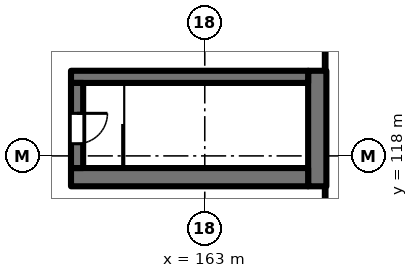
"""IFC4 building model, lengths in metres.
Left out: names, types, materials, properties, quantities, classifications, styles, units other than length and angle.
Written with IfcOpenShell. Run it as: python <this file> out.ifc"""

import sys

from ifc_helpers import new_model, si_unit, direction, frame, frame_2d, origin, place, context, subcontext, project, spatial, rectangle, extrude, element, fill, save


model = new_model("IFC4")
c1 = context("Model", 3, precision=1e-05, world=origin(), true_north=direction((0.0, 1.0)))
c2 = subcontext(c1, "Body", "Model", "MODEL_VIEW")
j1 = project(units=[si_unit("LENGTHUNIT", "METRE"), si_unit("PLANEANGLEUNIT", "RADIAN")], contexts=[c1])
p1 = place(None, origin())
s1 = spatial("IfcSite", under=j1, at=p1, CompositionType="ELEMENT")
p2 = place(p1, origin())
s2 = spatial("IfcBuilding", under=s1, at=p2, CompositionType="ELEMENT")
p3 = place(p2, frame((0.0, 0.0, 89.0)))
s3 = spatial("IfcBuildingStorey", under=s2, at=p3, CompositionType="ELEMENT", Elevation=89.0)
p4 = place(p3, frame((166.7, 120.8, 0.0), z_axis=(0.0, 0.0, 1.0), x_axis=(0.0, -1.0, 0.0)))
e1 = element("IfcWall", 1, at=p4, inside=s3, PredefinedType="SHEAR", context=c2, shape_type="SweptSolid", body=[
    extrude(rectangle(XDim=3.8, YDim=0.6, at=frame_2d((1.9, 0.0))), origin(), (0.0, 0.0, 1.0), 4.0),
])
p5 = place(p3, frame((166.4, 117.3, 0.0), z_axis=(0.0, 0.0, 1.0), x_axis=(-1.0, 0.0, 0.0)))
e2 = element("IfcWall", 2, at=p5, inside=s3, PredefinedType="SHEAR", context=c2, shape_type="SweptSolid", body=[
    extrude(rectangle(XDim=7.8, YDim=0.6, at=frame_2d((3.9, 0.0))), origin(), (0.0, 0.0, 1.0), 4.0),
])
p6 = place(p3, frame((166.4, 120.6, 0.0), z_axis=(0.0, 0.0, 1.0), x_axis=(-1.0, 0.0, 0.0)))
e3 = element("IfcWall", 3, at=p6, inside=s3, PredefinedType="SHEAR", context=c2, shape_type="SweptSolid", body=[
    extrude(rectangle(XDim=7.8, YDim=0.4, at=frame_2d((3.9, 0.0))), origin(), (0.0, 0.0, 1.0), 4.0),
])
p7 = place(p3, frame((158.8, 120.4, 0.0), z_axis=(0.0, 0.0, 1.0), x_axis=(0.0, -1.0, 0.0)))
e4 = element("IfcWall", 4, at=p7, inside=s3, PredefinedType="SHEAR", context=c2, shape_type="SweptSolid", body=[
    extrude(rectangle(XDim=2.8, YDim=0.4, at=frame_2d((1.4, 0.0))), origin(), (0.0, 0.0, 1.0), 4.0),
])
p8 = place(p7, frame((1.0, 0.0, 0.0)))
e5 = element("IfcOpeningElement", 5, at=p8, cuts=e4, PredefinedType="OPENING", context=c2, shape_type="SweptSolid", body=[
    extrude(rectangle(XDim=1.0, YDim=2.1, at=frame_2d((0.5, 1.05))), frame((0.0, 0.21, 0.0), z_axis=(0.0, -1.0, 0.0), x_axis=(1.0, 0.0, 0.0)), (0.0, 0.0, 1.0), 0.42),
])
p9 = place(p8, origin())
e6 = element("IfcDoor", 6, at=p9, inside=s3, OperationType="SINGLE_SWING_LEFT", PredefinedType="DOOR", context=c2, shape_type="SweptSolid", body=[
    extrude(rectangle(XDim=1.0, YDim=2.1, at=frame_2d((0.5, 1.05))), frame((0.0, 0.025, 0.0), z_axis=(0.0, -1.0, 0.0), x_axis=(1.0, 0.0, 0.0)), (0.0, 0.0, 1.0), 0.05),
])
fill(e5, e6)
save(model, sys.argv[1])
